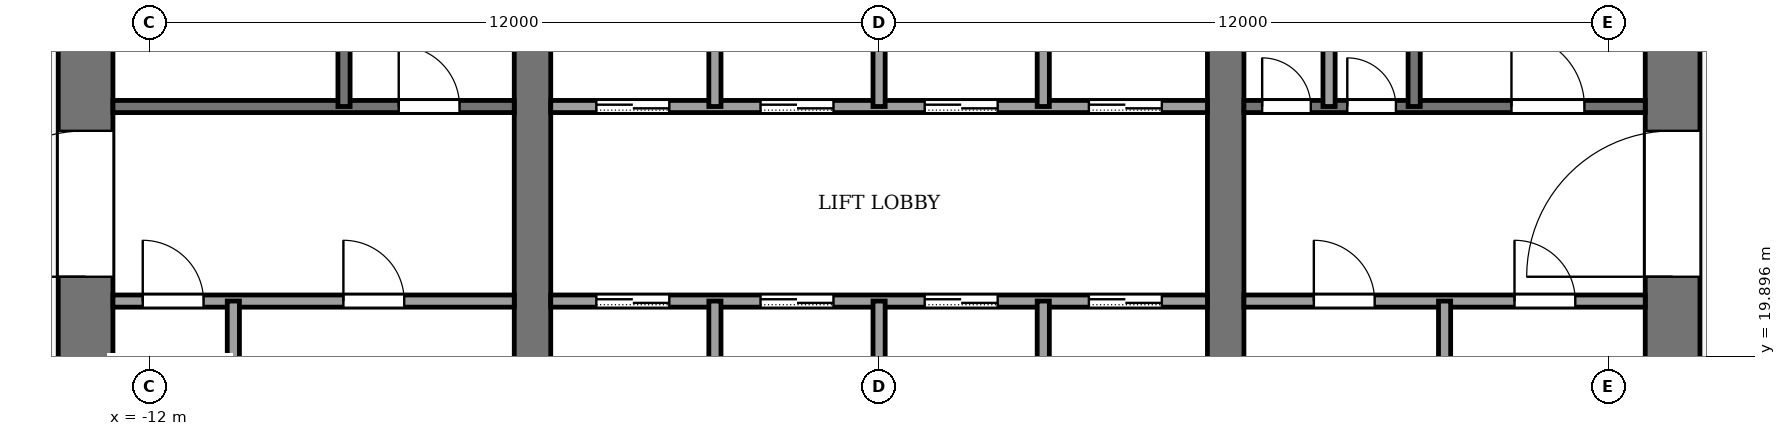
"""IFC4 building model, lengths in metres.
Left out: names, types, materials, properties, quantities, classifications, styles, units other than length and angle.
Written with IfcOpenShell. Run it as: python <this file> out.ifc"""

import sys

from ifc_helpers import new_model, si_unit, direction, frame, frame_2d, origin, place, context, subcontext, project, spatial, rectangle, extrude, element, fill, save


model = new_model("IFC4")
c1 = context("Model", 3, precision=1e-05, world=origin(), true_north=direction((0.0, 1.0)))
c2 = subcontext(c1, "Body", "Model", "MODEL_VIEW")
j1 = project(units=[si_unit("LENGTHUNIT", "METRE"), si_unit("PLANEANGLEUNIT", "RADIAN")], contexts=[c1])
p1 = place(None, origin())
s1 = spatial("IfcSite", under=j1, at=p1, CompositionType="ELEMENT")
p2 = place(p1, origin())
s2 = spatial("IfcBuilding", under=s1, at=p2, CompositionType="ELEMENT")
p3 = place(p2, frame((0.0, 0.0, 214.0)))
s3 = spatial("IfcBuildingStorey", under=s2, at=p3, CompositionType="ELEMENT", Elevation=214.0)
p4 = place(p3, frame((-13.05, 18.4, -0.13), z_axis=(0.0, 0.0, 1.0), x_axis=(0.0, 1.0, 0.0)))
e1 = element("IfcWall", 1, at=p4, inside=s3, PredefinedType="SHEAR", context=c2, shape_type="SweptSolid", body=[
    extrude(rectangle(XDim=19.2, YDim=0.9, at=frame_2d((9.6, 0.0))), origin(), (0.0, 0.0, 1.0), 4.0),
])
p5 = place(p4, frame((2.8, 0.0, 0.13)))
e2 = element("IfcOpeningElement", 2, at=p5, cuts=e1, PredefinedType="OPENING", context=c2, shape_type="SweptSolid", body=[
    extrude(rectangle(XDim=2.4, YDim=2.4, at=frame_2d((1.2, 1.2))), frame((0.0, 0.46, 0.0), z_axis=(0.0, -1.0, 0.0), x_axis=(1.0, 0.0, 0.0)), (0.0, 0.0, 1.0), 0.92),
])
p6 = place(p4, frame((13.4, 0.0, 0.13)))
e3 = element("IfcOpeningElement", 3, at=p6, cuts=e1, PredefinedType="OPENING", context=c2, shape_type="SweptSolid", body=[
    extrude(rectangle(XDim=1.4, YDim=2.2, at=frame_2d((0.7, 1.1))), frame((0.0, 0.46, 0.0), z_axis=(0.0, -1.0, 0.0), x_axis=(1.0, 0.0, 0.0)), (0.0, 0.0, 1.0), 0.92),
])
p7 = place(p3, frame((13.05, 18.4, -0.13), z_axis=(0.0, 0.0, 1.0), x_axis=(0.0, 1.0, 0.0)))
e4 = element("IfcWall", 4, at=p7, inside=s3, PredefinedType="SHEAR", context=c2, shape_type="SweptSolid", body=[
    extrude(rectangle(XDim=19.2, YDim=0.9, at=frame_2d((9.6, 0.0))), origin(), (0.0, 0.0, 1.0), 4.0),
])
p8 = place(p7, frame((2.8, 0.0, 0.13)))
e5 = element("IfcOpeningElement", 5, at=p8, cuts=e4, PredefinedType="OPENING", context=c2, shape_type="SweptSolid", body=[
    extrude(rectangle(XDim=2.4, YDim=2.4, at=frame_2d((1.2, 1.2))), frame((0.0, 0.46, 0.0), z_axis=(0.0, -1.0, 0.0), x_axis=(1.0, 0.0, 0.0)), (0.0, 0.0, 1.0), 0.92),
])
p9 = place(p7, frame((13.3, 0.0, 0.13)))
e6 = element("IfcOpeningElement", 6, at=p9, cuts=e4, PredefinedType="OPENING", context=c2, shape_type="SweptSolid", body=[
    extrude(rectangle(XDim=2.4, YDim=2.4, at=frame_2d((1.2, 1.2))), frame((0.0, 0.46, 0.0), z_axis=(0.0, -1.0, 0.0), x_axis=(1.0, 0.0, 0.0)), (0.0, 0.0, 1.0), 0.92),
])
p10 = place(p3, frame((-5.7, 18.4, -0.13), z_axis=(0.0, 0.0, 1.0), x_axis=(0.0, 1.0, 0.0)))
e7 = element("IfcWall", 7, at=p10, inside=s3, PredefinedType="SHEAR", context=c2, shape_type="SweptSolid", body=[
    extrude(rectangle(XDim=19.2, YDim=0.6, at=frame_2d((9.6, 0.0))), origin(), (0.0, 0.0, 1.0), 4.0),
])
p11 = place(p10, frame((8.35, 0.0, 0.13)))
e8 = element("IfcOpeningElement", 8, at=p11, cuts=e7, PredefinedType="OPENING", context=c2, shape_type="SweptSolid", body=[
    extrude(rectangle(XDim=0.9, YDim=2.1, at=frame_2d((0.45, 1.05))), frame((0.0, 0.31, 0.0), z_axis=(0.0, -1.0, 0.0), x_axis=(1.0, 0.0, 0.0)), (0.0, 0.0, 1.0), 0.62),
])
p12 = place(p3, frame((5.7, 18.4, -0.13), z_axis=(0.0, 0.0, 1.0), x_axis=(0.0, 1.0, 0.0)))
e9 = element("IfcWall", 9, at=p12, inside=s3, PredefinedType="SHEAR", context=c2, shape_type="SweptSolid", body=[
    extrude(rectangle(XDim=19.2, YDim=0.6, at=frame_2d((9.6, 0.0))), origin(), (0.0, 0.0, 1.0), 4.0),
])
p13 = place(p12, frame((13.3, 0.0, 0.13)))
e10 = element("IfcOpeningElement", 10, at=p13, cuts=e9, PredefinedType="OPENING", context=c2, shape_type="SweptSolid", body=[
    extrude(rectangle(XDim=2.4, YDim=2.4, at=frame_2d((1.2, 1.2))), frame((0.0, 0.31, 0.0), z_axis=(0.0, -1.0, 0.0), x_axis=(1.0, 0.0, 0.0)), (0.0, 0.0, 1.0), 0.62),
])
p14 = place(p3, frame((-12.6, 20.8, 0.0), z_axis=(0.0, 0.0, 1.0), x_axis=(1.0, 0.0, 0.0)))
e11 = element("IfcWall", 11, at=p14, inside=s3, PredefinedType="PARTITIONING", context=c2, shape_type="SweptSolid", body=[
    extrude(rectangle(XDim=6.6, YDim=0.2, at=frame_2d((3.3, 0.0))), origin(), (0.0, 0.0, 1.0), 3.87),
])
p15 = place(p14, frame((0.49, 0.0, 0.0)))
e12 = element("IfcOpeningElement", 12, at=p15, cuts=e11, PredefinedType="OPENING", context=c2, shape_type="SweptSolid", body=[
    extrude(rectangle(XDim=1.0, YDim=2.1, at=frame_2d((0.5, 1.05))), frame((0.0, 0.11, 0.0), z_axis=(0.0, -1.0, 0.0), x_axis=(1.0, 0.0, 0.0)), (0.0, 0.0, 1.0), 0.22),
])
p16 = place(p14, frame((3.79, 0.0, 0.0)))
e13 = element("IfcOpeningElement", 13, at=p16, cuts=e11, PredefinedType="OPENING", context=c2, shape_type="SweptSolid", body=[
    extrude(rectangle(XDim=1.0, YDim=2.1, at=frame_2d((0.5, 1.05))), frame((0.0, 0.11, 0.0), z_axis=(0.0, -1.0, 0.0), x_axis=(1.0, 0.0, 0.0)), (0.0, 0.0, 1.0), 0.22),
])
p17 = place(p3, frame((-5.4, 20.8, 0.0), z_axis=(0.0, 0.0, 1.0), x_axis=(1.0, 0.0, 0.0)))
e14 = element("IfcWall", 14, at=p17, inside=s3, PredefinedType="PARTITIONING", context=c2, shape_type="SweptSolid", body=[
    extrude(rectangle(XDim=10.8, YDim=0.2, at=frame_2d((5.4, 0.0))), origin(), (0.0, 0.0, 1.0), 3.87),
])
p18 = place(p17, frame((0.75, 0.0, 0.0)))
e15 = element("IfcOpeningElement", 15, at=p18, cuts=e14, PredefinedType="OPENING", context=c2, shape_type="SweptSolid", body=[
    extrude(rectangle(XDim=1.2, YDim=2.2, at=frame_2d((0.6, 1.1))), frame((0.0, 0.11, 0.0), z_axis=(0.0, -1.0, 0.0), x_axis=(1.0, 0.0, 0.0)), (0.0, 0.0, 1.0), 0.22),
])
p19 = place(p17, frame((3.45, 0.0, 0.0)))
e16 = element("IfcOpeningElement", 16, at=p19, cuts=e14, PredefinedType="OPENING", context=c2, shape_type="SweptSolid", body=[
    extrude(rectangle(XDim=1.2, YDim=2.2, at=frame_2d((0.6, 1.1))), frame((0.0, 0.11, 0.0), z_axis=(0.0, -1.0, 0.0), x_axis=(1.0, 0.0, 0.0)), (0.0, 0.0, 1.0), 0.22),
])
p20 = place(p17, frame((6.15, 0.0, 0.0)))
e17 = element("IfcOpeningElement", 17, at=p20, cuts=e14, PredefinedType="OPENING", context=c2, shape_type="SweptSolid", body=[
    extrude(rectangle(XDim=1.2, YDim=2.2, at=frame_2d((0.6, 1.1))), frame((0.0, 0.11, 0.0), z_axis=(0.0, -1.0, 0.0), x_axis=(1.0, 0.0, 0.0)), (0.0, 0.0, 1.0), 0.22),
])
p21 = place(p17, frame((8.85, 0.0, 0.0)))
e18 = element("IfcOpeningElement", 18, at=p21, cuts=e14, PredefinedType="OPENING", context=c2, shape_type="SweptSolid", body=[
    extrude(rectangle(XDim=1.2, YDim=2.2, at=frame_2d((0.6, 1.1))), frame((0.0, 0.11, 0.0), z_axis=(0.0, -1.0, 0.0), x_axis=(1.0, 0.0, 0.0)), (0.0, 0.0, 1.0), 0.22),
])
p22 = place(p3, frame((6.0, 20.8, 0.0), z_axis=(0.0, 0.0, 1.0), x_axis=(1.0, 0.0, 0.0)))
e19 = element("IfcWall", 19, at=p22, inside=s3, PredefinedType="PARTITIONING", context=c2, shape_type="SweptSolid", body=[
    extrude(rectangle(XDim=6.6, YDim=0.2, at=frame_2d((3.3, 0.0))), origin(), (0.0, 0.0, 1.0), 3.87),
])
p23 = place(p22, frame((1.15, 0.0, 0.0)))
e20 = element("IfcOpeningElement", 20, at=p23, cuts=e19, PredefinedType="OPENING", context=c2, shape_type="SweptSolid", body=[
    extrude(rectangle(XDim=1.0, YDim=2.1, at=frame_2d((0.5, 1.05))), frame((0.0, 0.11, 0.0), z_axis=(0.0, -1.0, 0.0), x_axis=(1.0, 0.0, 0.0)), (0.0, 0.0, 1.0), 0.22),
])
p24 = place(p22, frame((4.45, 0.0, 0.0)))
e21 = element("IfcOpeningElement", 21, at=p24, cuts=e19, PredefinedType="OPENING", context=c2, shape_type="SweptSolid", body=[
    extrude(rectangle(XDim=1.0, YDim=2.1, at=frame_2d((0.5, 1.05))), frame((0.0, 0.11, 0.0), z_axis=(0.0, -1.0, 0.0), x_axis=(1.0, 0.0, 0.0)), (0.0, 0.0, 1.0), 0.22),
])
p25 = place(p3, frame((-12.6, 24.0, 0.0), z_axis=(0.0, 0.0, 1.0), x_axis=(1.0, 0.0, 0.0)))
e22 = element("IfcWall", 22, at=p25, inside=s3, PredefinedType="PARTITIONING", context=c2, shape_type="SweptSolid", body=[
    extrude(rectangle(XDim=6.6, YDim=0.2, at=frame_2d((3.3, 0.0))), origin(), (0.0, 0.0, 1.0), 3.87),
])
p26 = place(p25, frame((4.7, 0.0, 0.0)))
e23 = element("IfcOpeningElement", 23, at=p26, cuts=e22, PredefinedType="OPENING", context=c2, shape_type="SweptSolid", body=[
    extrude(rectangle(XDim=1.0, YDim=2.1, at=frame_2d((0.5, 1.05))), frame((0.0, 0.11, 0.0), z_axis=(0.0, -1.0, 0.0), x_axis=(1.0, 0.0, 0.0)), (0.0, 0.0, 1.0), 0.22),
])
p27 = place(p3, frame((-5.4, 24.0, 0.0), z_axis=(0.0, 0.0, 1.0), x_axis=(1.0, 0.0, 0.0)))
e24 = element("IfcWall", 24, at=p27, inside=s3, PredefinedType="PARTITIONING", context=c2, shape_type="SweptSolid", body=[
    extrude(rectangle(XDim=10.8, YDim=0.2, at=frame_2d((5.4, 0.0))), origin(), (0.0, 0.0, 1.0), 3.87),
])
p28 = place(p27, frame((0.75, 0.0, 0.0)))
e25 = element("IfcOpeningElement", 25, at=p28, cuts=e24, PredefinedType="OPENING", context=c2, shape_type="SweptSolid", body=[
    extrude(rectangle(XDim=1.2, YDim=2.2, at=frame_2d((0.6, 1.1))), frame((0.0, 0.11, 0.0), z_axis=(0.0, -1.0, 0.0), x_axis=(1.0, 0.0, 0.0)), (0.0, 0.0, 1.0), 0.22),
])
p29 = place(p27, frame((3.45, 0.0, 0.0)))
e26 = element("IfcOpeningElement", 26, at=p29, cuts=e24, PredefinedType="OPENING", context=c2, shape_type="SweptSolid", body=[
    extrude(rectangle(XDim=1.2, YDim=2.2, at=frame_2d((0.6, 1.1))), frame((0.0, 0.11, 0.0), z_axis=(0.0, -1.0, 0.0), x_axis=(1.0, 0.0, 0.0)), (0.0, 0.0, 1.0), 0.22),
])
p30 = place(p27, frame((6.15, 0.0, 0.0)))
e27 = element("IfcOpeningElement", 27, at=p30, cuts=e24, PredefinedType="OPENING", context=c2, shape_type="SweptSolid", body=[
    extrude(rectangle(XDim=1.2, YDim=2.2, at=frame_2d((0.6, 1.1))), frame((0.0, 0.11, 0.0), z_axis=(0.0, -1.0, 0.0), x_axis=(1.0, 0.0, 0.0)), (0.0, 0.0, 1.0), 0.22),
])
p31 = place(p27, frame((8.85, 0.0, 0.0)))
e28 = element("IfcOpeningElement", 28, at=p31, cuts=e24, PredefinedType="OPENING", context=c2, shape_type="SweptSolid", body=[
    extrude(rectangle(XDim=1.2, YDim=2.2, at=frame_2d((0.6, 1.1))), frame((0.0, 0.11, 0.0), z_axis=(0.0, -1.0, 0.0), x_axis=(1.0, 0.0, 0.0)), (0.0, 0.0, 1.0), 0.22),
])
p32 = place(p3, frame((6.0, 24.0, 0.0), z_axis=(0.0, 0.0, 1.0), x_axis=(1.0, 0.0, 0.0)))
e29 = element("IfcWall", 29, at=p32, inside=s3, PredefinedType="PARTITIONING", context=c2, shape_type="SweptSolid", body=[
    extrude(rectangle(XDim=6.6, YDim=0.2, at=frame_2d((3.3, 0.0))), origin(), (0.0, 0.0, 1.0), 3.87),
])
p33 = place(p32, frame((0.3, 0.0, 0.0)))
e30 = element("IfcOpeningElement", 30, at=p33, cuts=e29, PredefinedType="OPENING", context=c2, shape_type="SweptSolid", body=[
    extrude(rectangle(XDim=0.8, YDim=2.1, at=frame_2d((0.4, 1.05))), frame((0.0, 0.11, 0.0), z_axis=(0.0, -1.0, 0.0), x_axis=(1.0, 0.0, 0.0)), (0.0, 0.0, 1.0), 0.22),
])
p34 = place(p32, frame((1.7, 0.0, 0.0)))
e31 = element("IfcOpeningElement", 31, at=p34, cuts=e29, PredefinedType="OPENING", context=c2, shape_type="SweptSolid", body=[
    extrude(rectangle(XDim=0.8, YDim=2.1, at=frame_2d((0.4, 1.05))), frame((0.0, 0.11, 0.0), z_axis=(0.0, -1.0, 0.0), x_axis=(1.0, 0.0, 0.0)), (0.0, 0.0, 1.0), 0.22),
])
p35 = place(p32, frame((4.4, 0.0, 0.0)))
e32 = element("IfcOpeningElement", 32, at=p35, cuts=e29, PredefinedType="OPENING", context=c2, shape_type="SweptSolid", body=[
    extrude(rectangle(XDim=1.2, YDim=2.2, at=frame_2d((0.6, 1.1))), frame((0.0, 0.11, 0.0), z_axis=(0.0, -1.0, 0.0), x_axis=(1.0, 0.0, 0.0)), (0.0, 0.0, 1.0), 0.22),
])
p36 = place(p3, frame((-10.62, 18.4, 0.0), z_axis=(0.0, 0.0, 1.0), x_axis=(0.0, 1.0, 0.0)))
e33 = element("IfcWall", 33, at=p36, inside=s3, PredefinedType="PARTITIONING", context=c2, shape_type="SweptSolid", body=[
    extrude(rectangle(XDim=2.4, YDim=0.2, at=frame_2d((1.2, 0.0))), origin(), (0.0, 0.0, 1.0), 3.87),
])
p37 = place(p3, frame((-8.8, 24.0, 0.0), z_axis=(0.0, 0.0, 1.0), x_axis=(0.0, 1.0, 0.0)))
e34 = element("IfcWall", 34, at=p37, inside=s3, PredefinedType="PARTITIONING", context=c2, shape_type="SweptSolid", body=[
    extrude(rectangle(XDim=7.4, YDim=0.2, at=frame_2d((3.7, 0.0))), origin(), (0.0, 0.0, 1.0), 3.87),
])
p38 = place(p3, frame((-2.7, 18.4, 0.0), z_axis=(0.0, 0.0, 1.0), x_axis=(0.0, 1.0, 0.0)))
e35 = element("IfcWall", 35, at=p38, inside=s3, PredefinedType="PARTITIONING", context=c2, shape_type="SweptSolid", body=[
    extrude(rectangle(XDim=2.4, YDim=0.2, at=frame_2d((1.2, 0.0))), origin(), (0.0, 0.0, 1.0), 3.87),
])
p39 = place(p3, frame((-2.7, 24.0, 0.0), z_axis=(0.0, 0.0, 1.0), x_axis=(0.0, 1.0, 0.0)))
e36 = element("IfcWall", 36, at=p39, inside=s3, PredefinedType="PARTITIONING", context=c2, shape_type="SweptSolid", body=[
    extrude(rectangle(XDim=2.4, YDim=0.2, at=frame_2d((1.2, 0.0))), origin(), (0.0, 0.0, 1.0), 3.87),
])
p40 = place(p3, frame((0.0, 18.4, 0.0), z_axis=(0.0, 0.0, 1.0), x_axis=(0.0, 1.0, 0.0)))
e37 = element("IfcWall", 37, at=p40, inside=s3, PredefinedType="PARTITIONING", context=c2, shape_type="SweptSolid", body=[
    extrude(rectangle(XDim=2.4, YDim=0.2, at=frame_2d((1.2, 0.0))), origin(), (0.0, 0.0, 1.0), 3.87),
])
p41 = place(p3, frame((0.0, 24.0, 0.0), z_axis=(0.0, 0.0, 1.0), x_axis=(0.0, 1.0, 0.0)))
e38 = element("IfcWall", 38, at=p41, inside=s3, PredefinedType="PARTITIONING", context=c2, shape_type="SweptSolid", body=[
    extrude(rectangle(XDim=2.4, YDim=0.2, at=frame_2d((1.2, 0.0))), origin(), (0.0, 0.0, 1.0), 3.87),
])
p42 = place(p3, frame((2.7, 18.4, 0.0), z_axis=(0.0, 0.0, 1.0), x_axis=(0.0, 1.0, 0.0)))
e39 = element("IfcWall", 39, at=p42, inside=s3, PredefinedType="PARTITIONING", context=c2, shape_type="SweptSolid", body=[
    extrude(rectangle(XDim=2.4, YDim=0.2, at=frame_2d((1.2, 0.0))), origin(), (0.0, 0.0, 1.0), 3.87),
])
p43 = place(p3, frame((2.7, 24.0, 0.0), z_axis=(0.0, 0.0, 1.0), x_axis=(0.0, 1.0, 0.0)))
e40 = element("IfcWall", 40, at=p43, inside=s3, PredefinedType="PARTITIONING", context=c2, shape_type="SweptSolid", body=[
    extrude(rectangle(XDim=2.4, YDim=0.2, at=frame_2d((1.2, 0.0))), origin(), (0.0, 0.0, 1.0), 3.87),
])
for number, where, z_axis, x_axis in (
    (41, (7.4, 24.0, 0.0), (0.0, 0.0, 1.0), (0.0, 1.0, 0.0)),
    (42, (8.8, 24.0, 0.0), (0.0, 0.0, 1.0), (0.0, 1.0, 0.0)),
):
    element("IfcWall", number, at=place(p3, frame(where, z_axis=z_axis, x_axis=x_axis)), inside=s3, PredefinedType="PARTITIONING", context=c2, shape_type="SweptSolid", body=[
        extrude(rectangle(XDim=7.4, YDim=0.2, at=frame_2d((3.7, 0.0))), origin(), (0.0, 0.0, 1.0), 3.87),
    ])
p44 = place(p3, frame((9.3, 18.4, 0.0), z_axis=(0.0, 0.0, 1.0), x_axis=(0.0, 1.0, 0.0)))
e43 = element("IfcWall", 43, at=p44, inside=s3, PredefinedType="PARTITIONING", context=c2, shape_type="SweptSolid", body=[
    extrude(rectangle(XDim=2.4, YDim=0.2, at=frame_2d((1.2, 0.0))), origin(), (0.0, 0.0, 1.0), 3.87),
])
p45 = place(p18, origin())
e44 = element("IfcDoor", 44, at=p45, inside=s3, OperationType="SLIDING_TO_LEFT", PredefinedType="DOOR", context=c2, shape_type="SweptSolid", body=[
    extrude(rectangle(XDim=1.2, YDim=2.2, at=frame_2d((0.6, 1.1))), frame((0.0, 0.025, 0.0), z_axis=(0.0, -1.0, 0.0), x_axis=(1.0, 0.0, 0.0)), (0.0, 0.0, 1.0), 0.05),
])
fill(e15, e44)
p46 = place(p19, origin())
e45 = element("IfcDoor", 45, at=p46, inside=s3, OperationType="SLIDING_TO_LEFT", PredefinedType="DOOR", context=c2, shape_type="SweptSolid", body=[
    extrude(rectangle(XDim=1.2, YDim=2.2, at=frame_2d((0.6, 1.1))), frame((0.0, 0.025, 0.0), z_axis=(0.0, -1.0, 0.0), x_axis=(1.0, 0.0, 0.0)), (0.0, 0.0, 1.0), 0.05),
])
fill(e16, e45)
p47 = place(p20, origin())
e46 = element("IfcDoor", 46, at=p47, inside=s3, OperationType="SLIDING_TO_LEFT", PredefinedType="DOOR", context=c2, shape_type="SweptSolid", body=[
    extrude(rectangle(XDim=1.2, YDim=2.2, at=frame_2d((0.6, 1.1))), frame((0.0, 0.025, 0.0), z_axis=(0.0, -1.0, 0.0), x_axis=(1.0, 0.0, 0.0)), (0.0, 0.0, 1.0), 0.05),
])
fill(e17, e46)
p48 = place(p21, origin())
e47 = element("IfcDoor", 47, at=p48, inside=s3, OperationType="SLIDING_TO_LEFT", PredefinedType="DOOR", context=c2, shape_type="SweptSolid", body=[
    extrude(rectangle(XDim=1.2, YDim=2.2, at=frame_2d((0.6, 1.1))), frame((0.0, 0.025, 0.0), z_axis=(0.0, -1.0, 0.0), x_axis=(1.0, 0.0, 0.0)), (0.0, 0.0, 1.0), 0.05),
])
fill(e18, e47)
p49 = place(p28, origin())
e48 = element("IfcDoor", 48, at=p49, inside=s3, OperationType="SLIDING_TO_LEFT", PredefinedType="DOOR", context=c2, shape_type="SweptSolid", body=[
    extrude(rectangle(XDim=1.2, YDim=2.2, at=frame_2d((0.6, 1.1))), frame((0.0, 0.025, 0.0), z_axis=(0.0, -1.0, 0.0), x_axis=(1.0, 0.0, 0.0)), (0.0, 0.0, 1.0), 0.05),
])
fill(e25, e48)
p50 = place(p29, origin())
e49 = element("IfcDoor", 49, at=p50, inside=s3, OperationType="SLIDING_TO_LEFT", PredefinedType="DOOR", context=c2, shape_type="SweptSolid", body=[
    extrude(rectangle(XDim=1.2, YDim=2.2, at=frame_2d((0.6, 1.1))), frame((0.0, 0.025, 0.0), z_axis=(0.0, -1.0, 0.0), x_axis=(1.0, 0.0, 0.0)), (0.0, 0.0, 1.0), 0.05),
])
fill(e26, e49)
p51 = place(p30, origin())
e50 = element("IfcDoor", 50, at=p51, inside=s3, OperationType="SLIDING_TO_LEFT", PredefinedType="DOOR", context=c2, shape_type="SweptSolid", body=[
    extrude(rectangle(XDim=1.2, YDim=2.2, at=frame_2d((0.6, 1.1))), frame((0.0, 0.025, 0.0), z_axis=(0.0, -1.0, 0.0), x_axis=(1.0, 0.0, 0.0)), (0.0, 0.0, 1.0), 0.05),
])
fill(e27, e50)
p52 = place(p31, origin())
e51 = element("IfcDoor", 51, at=p52, inside=s3, OperationType="SLIDING_TO_LEFT", PredefinedType="DOOR", context=c2, shape_type="SweptSolid", body=[
    extrude(rectangle(XDim=1.2, YDim=2.2, at=frame_2d((0.6, 1.1))), frame((0.0, 0.025, 0.0), z_axis=(0.0, -1.0, 0.0), x_axis=(1.0, 0.0, 0.0)), (0.0, 0.0, 1.0), 0.05),
])
fill(e28, e51)
p53 = place(p15, origin())
e52 = element("IfcDoor", 52, at=p53, inside=s3, OperationType="SINGLE_SWING_RIGHT", PredefinedType="DOOR", context=c2, shape_type="SweptSolid", body=[
    extrude(rectangle(XDim=1.0, YDim=2.1, at=frame_2d((0.5, 1.05))), frame((0.0, 0.025, 0.0), z_axis=(0.0, -1.0, 0.0), x_axis=(1.0, 0.0, 0.0)), (0.0, 0.0, 1.0), 0.05),
])
fill(e12, e52)
p54 = place(p16, origin())
e53 = element("IfcDoor", 53, at=p54, inside=s3, OperationType="SINGLE_SWING_RIGHT", PredefinedType="DOOR", context=c2, shape_type="SweptSolid", body=[
    extrude(rectangle(XDim=1.0, YDim=2.1, at=frame_2d((0.5, 1.05))), frame((0.0, 0.025, 0.0), z_axis=(0.0, -1.0, 0.0), x_axis=(1.0, 0.0, 0.0)), (0.0, 0.0, 1.0), 0.05),
])
fill(e13, e53)
p55 = place(p23, origin())
e54 = element("IfcDoor", 54, at=p55, inside=s3, OperationType="SINGLE_SWING_LEFT", PredefinedType="DOOR", context=c2, shape_type="SweptSolid", body=[
    extrude(rectangle(XDim=1.0, YDim=2.1, at=frame_2d((0.5, 1.05))), frame((0.0, 0.025, 0.0), z_axis=(0.0, -1.0, 0.0), x_axis=(1.0, 0.0, 0.0)), (0.0, 0.0, 1.0), 0.05),
])
fill(e20, e54)
p56 = place(p24, origin())
e55 = element("IfcDoor", 55, at=p56, inside=s3, OperationType="SINGLE_SWING_LEFT", PredefinedType="DOOR", context=c2, shape_type="SweptSolid", body=[
    extrude(rectangle(XDim=1.0, YDim=2.1, at=frame_2d((0.5, 1.05))), frame((0.0, 0.025, 0.0), z_axis=(0.0, -1.0, 0.0), x_axis=(1.0, 0.0, 0.0)), (0.0, 0.0, 1.0), 0.05),
])
fill(e21, e55)
p57 = place(p26, origin())
e56 = element("IfcDoor", 56, at=p57, inside=s3, OperationType="SINGLE_SWING_RIGHT", PredefinedType="DOOR", context=c2, shape_type="SweptSolid", body=[
    extrude(rectangle(XDim=1.0, YDim=2.1, at=frame_2d((0.5, 1.05))), frame((0.0, 0.025, 0.0), z_axis=(0.0, -1.0, 0.0), x_axis=(1.0, 0.0, 0.0)), (0.0, 0.0, 1.0), 0.05),
])
fill(e23, e56)
p58 = place(p33, origin())
e57 = element("IfcDoor", 57, at=p58, inside=s3, OperationType="SINGLE_SWING_RIGHT", PredefinedType="DOOR", context=c2, shape_type="SweptSolid", body=[
    extrude(rectangle(XDim=0.8, YDim=2.1, at=frame_2d((0.4, 1.05))), frame((0.0, 0.025, 0.0), z_axis=(0.0, -1.0, 0.0), x_axis=(1.0, 0.0, 0.0)), (0.0, 0.0, 1.0), 0.05),
])
fill(e30, e57)
p59 = place(p34, origin())
e58 = element("IfcDoor", 58, at=p59, inside=s3, OperationType="SINGLE_SWING_LEFT", PredefinedType="DOOR", context=c2, shape_type="SweptSolid", body=[
    extrude(rectangle(XDim=0.8, YDim=2.1, at=frame_2d((0.4, 1.05))), frame((0.0, 0.025, 0.0), z_axis=(0.0, -1.0, 0.0), x_axis=(1.0, 0.0, 0.0)), (0.0, 0.0, 1.0), 0.05),
])
fill(e31, e58)
p60 = place(p35, origin())
e59 = element("IfcDoor", 59, at=p60, inside=s3, OperationType="SINGLE_SWING_RIGHT", PredefinedType="DOOR", context=c2, shape_type="SweptSolid", body=[
    extrude(rectangle(XDim=1.2, YDim=2.2, at=frame_2d((0.6, 1.1))), frame((0.0, 0.025, 0.0), z_axis=(0.0, -1.0, 0.0), x_axis=(1.0, 0.0, 0.0)), (0.0, 0.0, 1.0), 0.05),
])
fill(e32, e59)
p61 = place(p5, origin())
e60 = element("IfcDoor", 60, at=p61, inside=s3, OperationType="DOUBLE_DOOR_SINGLE_SWING", PredefinedType="DOOR", context=c2, shape_type="SweptSolid", body=[
    extrude(rectangle(XDim=2.4, YDim=2.4, at=frame_2d((1.2, 1.2))), frame((0.0, 0.025, 0.0), z_axis=(0.0, -1.0, 0.0), x_axis=(1.0, 0.0, 0.0)), (0.0, 0.0, 1.0), 0.05),
])
fill(e2, e60)
p62 = place(p8, origin())
e61 = element("IfcDoor", 61, at=p62, inside=s3, OperationType="DOUBLE_DOOR_SINGLE_SWING", PredefinedType="DOOR", context=c2, shape_type="SweptSolid", body=[
    extrude(rectangle(XDim=2.4, YDim=2.4, at=frame_2d((1.2, 1.2))), frame((0.0, 0.025, 0.0), z_axis=(0.0, -1.0, 0.0), x_axis=(1.0, 0.0, 0.0)), (0.0, 0.0, 1.0), 0.05),
])
fill(e5, e61)
save(model, sys.argv[1])
